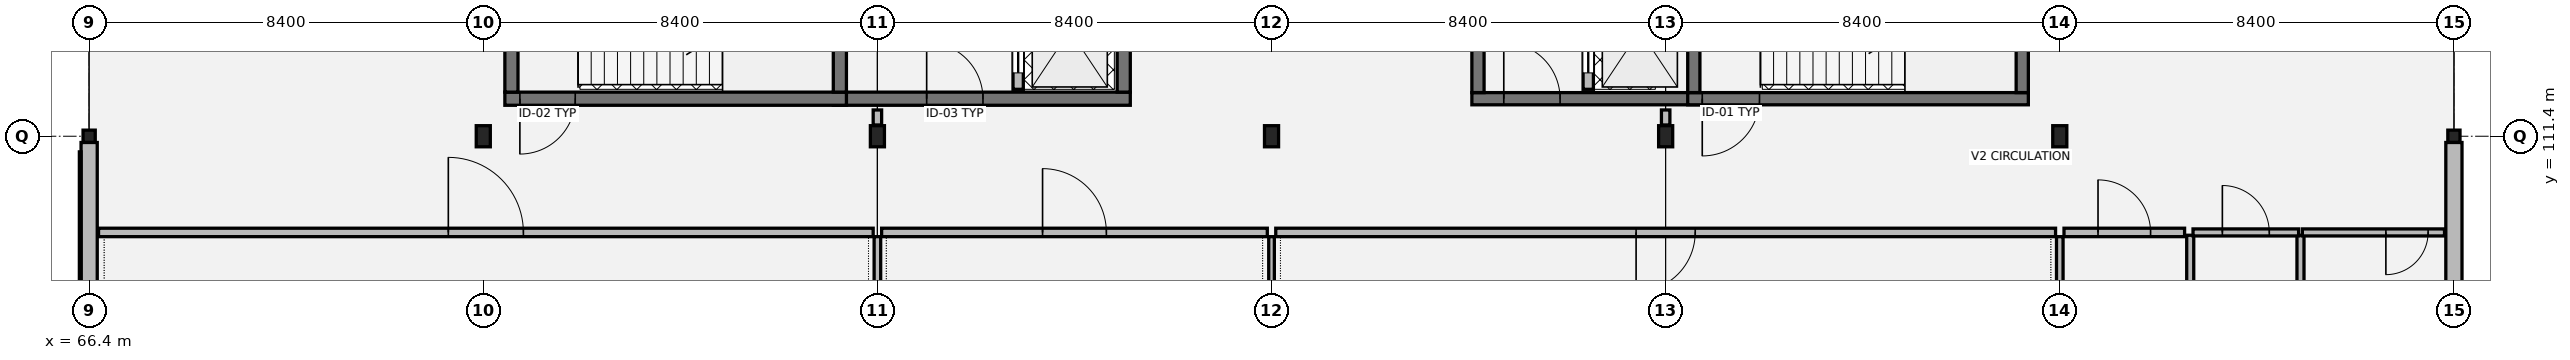
"""IFC4 building model, lengths in metres.
Left out: names, types, materials, properties, quantities, classifications, styles, units other than length and angle.
Written with IfcOpenShell. Run it as: python <this file> out.ifc"""

import sys

from ifc_helpers import new_model, si_unit, direction, frame, frame_2d, origin, origin_2d, place, context, subcontext, project, spatial, rectangle, hollow_rectangle, i_section, extrude, element, fill, save


model = new_model("IFC4")
c1 = context("Model", 3, precision=1e-05, world=origin(), true_north=direction((0.0, 1.0)))
c2 = subcontext(c1, "Body", "Model", "MODEL_VIEW")
j1 = project(units=[si_unit("LENGTHUNIT", "METRE"), si_unit("PLANEANGLEUNIT", "RADIAN")], contexts=[c1])
p1 = place(None, origin())
s1 = spatial("IfcSite", under=j1, at=p1, CompositionType="ELEMENT")
p2 = place(p1, origin())
s2 = spatial("IfcBuilding", under=s1, at=p2, CompositionType="ELEMENT")
p3 = place(p2, frame((0.0, 0.0, 9.18)))
s3 = spatial("IfcBuildingStorey", under=s2, at=p3, CompositionType="ELEMENT", Elevation=9.18)
p4 = place(p3, frame((66.4, 111.4, 0.0), z_axis=(0.0, 0.0, 1.0), x_axis=(1.0, 0.0, 0.0)))
e1 = element("IfcColumn", 1, at=p4, inside=s3, PredefinedType="COLUMN", context=c2, shape_type="SweptSolid", body=[
    extrude(hollow_rectangle(XDim=0.26, YDim=0.26, WallThickness=0.012, at=origin_2d()), origin(), (0.0, 0.0, 1.0), 4.055),
])
for number, where, z_axis, x_axis in (
    (2, (74.8, 111.4, 0.0), (0.0, 0.0, 1.0), (1.0, 0.0, 0.0)),
    (3, (83.2, 111.4, 0.0), (0.0, 0.0, 1.0), (1.0, 0.0, 0.0)),
    (4, (91.6, 111.4, 0.0), (0.0, 0.0, 1.0), (1.0, 0.0, 0.0)),
    (5, (100.0, 111.4, 0.0), (0.0, 0.0, 1.0), (1.0, 0.0, 0.0)),
    (6, (108.4, 111.4, 0.0), (0.0, 0.0, 1.0), (1.0, 0.0, 0.0)),
):
    element("IfcColumn", number, at=place(p3, frame(where, z_axis=z_axis, x_axis=x_axis)), inside=s3, PredefinedType="COLUMN", context=c2, shape_type="SweptSolid", body=[
        extrude(i_section(OverallWidth=0.3, OverallDepth=0.45, WebThickness=0.014, FlangeThickness=0.026, at=origin_2d()), origin(), (0.0, 0.0, 1.0), 4.055),
    ])
p5 = place(p3, frame((116.8, 111.4, 0.0), z_axis=(0.0, 0.0, 1.0), x_axis=(1.0, 0.0, 0.0)))
e7 = element("IfcColumn", 7, at=p5, inside=s3, PredefinedType="COLUMN", context=c2, shape_type="SweptSolid", body=[
    extrude(hollow_rectangle(XDim=0.26, YDim=0.26, WallThickness=0.012, at=origin_2d()), origin(), (0.0, 0.0, 1.0), 4.055),
])
for number, where, z_axis, x_axis in (
    (8, (116.8, 103.933, 0.0), (0.0, 0.0, 1.0), (0.0, 1.0, 0.0)),
    (9, (66.4, 111.267, 0.0), (0.0, 0.0, 1.0), (0.0, -1.0, 0.0)),
):
    element("IfcWall", number, at=place(p3, frame(where, z_axis=z_axis, x_axis=x_axis)), inside=s3, PredefinedType="SOLIDWALL", context=c2, shape_type="SweptSolid", body=[
        extrude(rectangle(XDim=7.334, YDim=0.345, at=frame_2d((3.667, 0.0))), origin(), (0.0, 0.0, 1.0), 3.48),
    ])
p6 = place(p3, frame((82.26, 112.2, 0.0), z_axis=(0.0, 0.0, 1.0), x_axis=(1.0, 0.0, 0.0)))
e10 = element("IfcWall", 10, at=p6, inside=s3, PredefinedType="SHEAR", context=c2, shape_type="SweptSolid", body=[
    extrude(rectangle(XDim=6.33, YDim=0.28, at=frame_2d((3.165, 0.0))), origin(), (0.0, 0.0, 1.0), 3.845),
])
p7 = place(p6, frame((1.99, 0.0, 0.0)))
e11 = element("IfcOpeningElement", 11, at=p7, cuts=e10, PredefinedType="OPENING", context=c2, shape_type="SweptSolid", body=[
    extrude(rectangle(XDim=1.2, YDim=2.16, at=frame_2d((0.6, 1.08))), frame((0.0, 0.15, 0.0), z_axis=(0.0, -1.0, 0.0), x_axis=(1.0, 0.0, 0.0)), (0.0, 0.0, 1.0), 0.3),
])
p8 = place(p3, frame((88.45, 112.34, 0.0), z_axis=(0.0, 0.0, 1.0), x_axis=(0.0, 1.0, 0.0)))
e12 = element("IfcWall", 12, at=p8, inside=s3, PredefinedType="SHEAR", context=c2, shape_type="SweptSolid", body=[
    extrude(rectangle(XDim=5.72, YDim=0.28, at=frame_2d((2.86, 0.0))), origin(), (0.0, 0.0, 1.0), 3.845),
])
p9 = place(p3, frame((86.2, 112.4, 0.0), z_axis=(0.0, 0.0, 1.0), x_axis=(0.0, 1.0, 0.0)))
e13 = element("IfcWall", 13, at=p9, inside=s3, PredefinedType="SOLIDWALL", context=c2, shape_type="SweptSolid", body=[
    extrude(rectangle(XDim=5.6, YDim=0.22, at=frame_2d((2.8, 0.0))), origin(), (0.0, 0.0, 1.0), 3.845),
])
p10 = place(p9, frame((0.35, 0.0, 0.0)))
e14 = element("IfcOpeningElement", 14, at=p10, cuts=e13, PredefinedType="OPENING", context=c2, shape_type="SweptSolid", body=[
    extrude(rectangle(XDim=1.1, YDim=2.15, at=frame_2d((0.55, 1.075))), frame((0.0, 0.12, 0.0), z_axis=(0.0, -1.0, 0.0), x_axis=(1.0, 0.0, 0.0)), (0.0, 0.0, 1.0), 0.24),
])
p11 = place(p9, frame((2.4, 0.0, 0.0)))
e15 = element("IfcOpeningElement", 15, at=p11, cuts=e13, PredefinedType="OPENING", context=c2, shape_type="SweptSolid", body=[
    extrude(rectangle(XDim=1.1, YDim=2.15, at=frame_2d((0.55, 1.075))), frame((0.0, 0.12, 0.0), z_axis=(0.0, -1.0, 0.0), x_axis=(1.0, 0.0, 0.0)), (0.0, 0.0, 1.0), 0.24),
])
p12 = place(p3, frame((75.26, 112.2, 0.0), z_axis=(0.0, 0.0, 1.0), x_axis=(1.0, 0.0, 0.0)))
e16 = element("IfcWall", 16, at=p12, inside=s3, PredefinedType="SHEAR", context=c2, shape_type="SweptSolid", body=[
    extrude(rectangle(XDim=7.28, YDim=0.28, at=frame_2d((3.64, 0.0))), origin(), (0.0, 0.0, 1.0), 3.845),
])
p13 = place(p12, frame((0.32, 0.0, 0.0)))
e17 = element("IfcOpeningElement", 17, at=p13, cuts=e16, PredefinedType="OPENING", context=c2, shape_type="SweptSolid", body=[
    extrude(rectangle(XDim=1.18, YDim=2.18, at=frame_2d((0.59, 1.09))), frame((0.0, 0.15, 0.0), z_axis=(0.0, -1.0, 0.0), x_axis=(1.0, 0.0, 0.0)), (0.0, 0.0, 1.0), 0.3),
])
for number, where, z_axis, x_axis in (
    (18, (75.4, 112.34, 0.0), (0.0, 0.0, 1.0), (0.0, 1.0, 0.0)),
    (19, (82.4, 112.34, 0.0), (0.0, 0.0, 1.0), (0.0, 1.0, 0.0)),
):
    element("IfcWall", number, at=place(p3, frame(where, z_axis=z_axis, x_axis=x_axis)), inside=s3, PredefinedType="SHEAR", context=c2, shape_type="SweptSolid", body=[
        extrude(rectangle(XDim=5.72, YDim=0.28, at=frame_2d((2.86, 0.0))), origin(), (0.0, 0.0, 1.0), 3.845),
    ])
p14 = place(p3, frame((95.87, 112.2, 0.0), z_axis=(0.0, 0.0, 1.0), x_axis=(1.0, 0.0, 0.0)))
e20 = element("IfcWall", 20, at=p14, inside=s3, PredefinedType="SHEAR", context=c2, shape_type="SweptSolid", body=[
    extrude(rectangle(XDim=4.86, YDim=0.26, at=frame_2d((2.43, 0.0))), origin(), (0.0, 0.0, 1.0), 3.845),
])
p15 = place(p14, frame((0.68, 0.0, 0.0)))
e21 = element("IfcOpeningElement", 21, at=p15, cuts=e20, PredefinedType="OPENING", context=c2, shape_type="SweptSolid", body=[
    extrude(rectangle(XDim=1.2, YDim=2.16, at=frame_2d((0.6, 1.08))), frame((0.0, 0.14, 0.0), z_axis=(0.0, -1.0, 0.0), x_axis=(1.0, 0.0, 0.0)), (0.0, 0.0, 1.0), 0.28),
])
p16 = place(p3, frame((96.0, 118.07, 0.0), z_axis=(0.0, 0.0, 1.0), x_axis=(0.0, -1.0, 0.0)))
e22 = element("IfcWall", 22, at=p16, inside=s3, PredefinedType="SHEAR", context=c2, shape_type="SweptSolid", body=[
    extrude(rectangle(XDim=5.74, YDim=0.26, at=frame_2d((2.87, 0.0))), origin(), (0.0, 0.0, 1.0), 3.845),
])
p17 = place(p3, frame((98.35, 112.4, 0.0), z_axis=(0.0, 0.0, 1.0), x_axis=(0.0, 1.0, 0.0)))
e23 = element("IfcWall", 23, at=p17, inside=s3, PredefinedType="SOLIDWALL", context=c2, shape_type="SweptSolid", body=[
    extrude(rectangle(XDim=5.6, YDim=0.22, at=frame_2d((2.8, 0.0))), origin(), (0.0, 0.0, 1.0), 3.845),
])
p18 = place(p17, frame((0.35, 0.0, 0.0)))
e24 = element("IfcOpeningElement", 24, at=p18, cuts=e23, PredefinedType="OPENING", context=c2, shape_type="SweptSolid", body=[
    extrude(rectangle(XDim=1.1, YDim=2.15, at=frame_2d((0.55, 1.075))), frame((0.0, 0.12, 0.0), z_axis=(0.0, -1.0, 0.0), x_axis=(1.0, 0.0, 0.0)), (0.0, 0.0, 1.0), 0.24),
])
p19 = place(p3, frame((100.47, 112.2, 0.0), z_axis=(0.0, 0.0, 1.0), x_axis=(1.0, 0.0, 0.0)))
e25 = element("IfcWall", 25, at=p19, inside=s3, PredefinedType="SHEAR", context=c2, shape_type="SweptSolid", body=[
    extrude(rectangle(XDim=7.26, YDim=0.26, at=frame_2d((3.63, 0.0))), origin(), (0.0, 0.0, 1.0), 3.845),
])
p20 = place(p19, frame((0.31, 0.0, 0.0)))
e26 = element("IfcOpeningElement", 26, at=p20, cuts=e25, PredefinedType="OPENING", context=c2, shape_type="SweptSolid", body=[
    extrude(rectangle(XDim=1.22, YDim=2.18, at=frame_2d((0.61, 1.09))), frame((0.0, 0.14, 0.0), z_axis=(0.0, -1.0, 0.0), x_axis=(1.0, 0.0, 0.0)), (0.0, 0.0, 1.0), 0.28),
])
for number, where, z_axis, x_axis in (
    (27, (100.6, 112.33, 0.0), (0.0, 0.0, 1.0), (0.0, 1.0, 0.0)),
    (28, (107.6, 112.33, 0.0), (0.0, 0.0, 1.0), (0.0, 1.0, 0.0)),
):
    element("IfcWall", number, at=place(p3, frame(where, z_axis=z_axis, x_axis=x_axis)), inside=s3, PredefinedType="SHEAR", context=c2, shape_type="SweptSolid", body=[
        extrude(rectangle(XDim=5.74, YDim=0.26, at=frame_2d((2.87, 0.0))), origin(), (0.0, 0.0, 1.0), 3.845),
    ])
for number, where, z_axis, x_axis in (
    (29, (111.18, 106.93, 0.0), (0.0, 0.0, 1.0), (0.0, 1.0, 0.0)),
    (30, (113.53, 106.93, 0.0), (0.0, 0.0, 1.0), (0.0, 1.0, 0.0)),
):
    element("IfcWall", number, at=place(p3, frame(where, z_axis=z_axis, x_axis=x_axis)), inside=s3, PredefinedType="PARTITIONING", context=c2, shape_type="SweptSolid", body=[
        extrude(rectangle(XDim=2.36, YDim=0.15, at=frame_2d((1.18, 0.0))), origin(), (0.0, 0.0, 1.0), 3.18),
    ])
p21 = place(p3, frame((111.24, 109.35, 0.0), z_axis=(0.0, 0.0, 1.0), x_axis=(1.0, 0.0, 0.0)))
e31 = element("IfcWall", 31, at=p21, inside=s3, PredefinedType="PARTITIONING", context=c2, shape_type="SweptSolid", body=[
    extrude(rectangle(XDim=2.25, YDim=0.15, at=frame_2d((1.125, 0.0))), origin(), (0.0, 0.0, 1.0), 3.18),
])
p22 = place(p21, frame((0.625, 0.0, 0.0)))
e32 = element("IfcOpeningElement", 32, at=p22, cuts=e31, PredefinedType="OPENING", context=c2, shape_type="SweptSolid", body=[
    extrude(rectangle(XDim=1.0, YDim=2.15, at=frame_2d((0.5, 1.075))), frame((0.0, 0.085, 0.0), z_axis=(0.0, -1.0, 0.0), x_axis=(1.0, 0.0, 0.0)), (0.0, 0.0, 1.0), 0.17),
])
p23 = place(p3, frame((113.57, 109.35, 0.0), z_axis=(0.0, 0.0, 1.0), x_axis=(1.0, 0.0, 0.0)))
e33 = element("IfcWall", 33, at=p23, inside=s3, PredefinedType="PARTITIONING", context=c2, shape_type="SweptSolid", body=[
    extrude(rectangle(XDim=3.03, YDim=0.15, at=frame_2d((1.515, 0.0))), origin(), (0.0, 0.0, 1.0), 3.18),
])
p24 = place(p23, frame((1.78, 0.0, 0.0)))
e34 = element("IfcOpeningElement", 34, at=p24, cuts=e33, PredefinedType="OPENING", context=c2, shape_type="SweptSolid", body=[
    extrude(rectangle(XDim=0.9, YDim=2.15, at=frame_2d((0.45, 1.075))), frame((0.0, 0.085, 0.0), z_axis=(0.0, -1.0, 0.0), x_axis=(1.0, 0.0, 0.0)), (0.0, 0.0, 1.0), 0.17),
])
p25 = place(p3, frame((66.6, 109.35, 0.0), z_axis=(0.0, 0.0, 1.0), x_axis=(1.0, 0.0, 0.0)))
e35 = element("IfcWall", 35, at=p25, inside=s3, PredefinedType="PARTITIONING", context=c2, shape_type="SweptSolid", body=[
    extrude(rectangle(XDim=16.51, YDim=0.18, at=frame_2d((8.255, 0.0))), origin(), (0.0, 0.0, 1.0), 3.18),
])
p26 = place(p25, frame((7.455, 0.0, 0.0)))
e36 = element("IfcOpeningElement", 36, at=p26, cuts=e35, PredefinedType="OPENING", context=c2, shape_type="SweptSolid", body=[
    extrude(rectangle(XDim=1.6, YDim=2.25, at=frame_2d((0.8, 1.125))), frame((0.0, 0.1, 0.0), z_axis=(0.0, -1.0, 0.0), x_axis=(1.0, 0.0, 0.0)), (0.0, 0.0, 1.0), 0.2),
])
p27 = place(p3, frame((83.29, 109.35, 0.0), z_axis=(0.0, 0.0, 1.0), x_axis=(1.0, 0.0, 0.0)))
e37 = element("IfcWall", 37, at=p27, inside=s3, PredefinedType="PARTITIONING", context=c2, shape_type="SweptSolid", body=[
    extrude(rectangle(XDim=8.22, YDim=0.18, at=frame_2d((4.11, 0.0))), origin(), (0.0, 0.0, 1.0), 3.18),
])
p28 = place(p27, frame((3.43, 0.0, 0.0)))
e38 = element("IfcOpeningElement", 38, at=p28, cuts=e37, PredefinedType="OPENING", context=c2, shape_type="SweptSolid", body=[
    extrude(rectangle(XDim=1.36, YDim=2.2, at=frame_2d((0.68, 1.1))), frame((0.0, 0.1, 0.0), z_axis=(0.0, -1.0, 0.0), x_axis=(1.0, 0.0, 0.0)), (0.0, 0.0, 1.0), 0.2),
])
p29 = place(p3, frame((91.69, 109.35, 0.0), z_axis=(0.0, 0.0, 1.0), x_axis=(1.0, 0.0, 0.0)))
e39 = element("IfcWall", 39, at=p29, inside=s3, PredefinedType="PARTITIONING", context=c2, shape_type="SweptSolid", body=[
    extrude(rectangle(XDim=16.62, YDim=0.18, at=frame_2d((8.31, 0.0))), origin(), (0.0, 0.0, 1.0), 3.18),
])
p30 = place(p29, frame((7.68, 0.0, 0.0)))
e40 = element("IfcOpeningElement", 40, at=p30, cuts=e39, PredefinedType="OPENING", context=c2, shape_type="SweptSolid", body=[
    extrude(rectangle(XDim=1.26, YDim=2.2, at=frame_2d((0.63, 1.1))), frame((0.0, 0.1, 0.0), z_axis=(0.0, -1.0, 0.0), x_axis=(1.0, 0.0, 0.0)), (0.0, 0.0, 1.0), 0.2),
])
p31 = place(p3, frame((108.49, 109.35, 0.0), z_axis=(0.0, 0.0, 1.0), x_axis=(1.0, 0.0, 0.0)))
e41 = element("IfcWall", 41, at=p31, inside=s3, PredefinedType="PARTITIONING", context=c2, shape_type="SweptSolid", body=[
    extrude(rectangle(XDim=2.57, YDim=0.18, at=frame_2d((1.285, 0.0))), origin(), (0.0, 0.0, 1.0), 3.18),
])
p32 = place(p31, frame((0.725, 0.0, 0.0)))
e42 = element("IfcOpeningElement", 42, at=p32, cuts=e41, PredefinedType="OPENING", context=c2, shape_type="SweptSolid", body=[
    extrude(rectangle(XDim=1.12, YDim=2.15, at=frame_2d((0.56, 1.075))), frame((0.0, 0.1, 0.0), z_axis=(0.0, -1.0, 0.0), x_axis=(1.0, 0.0, 0.0)), (0.0, 0.0, 1.0), 0.2),
])
for number, where, z_axis, x_axis in (
    (43, (83.2, 111.64, 0.0), (0.0, 0.0, 1.0), (0.0, 1.0, 0.0)),
    (44, (100.0, 111.64, 0.0), (0.0, 0.0, 1.0), (0.0, 1.0, 0.0)),
):
    element("IfcWall", number, at=place(p3, frame(where, z_axis=z_axis, x_axis=x_axis)), inside=s3, PredefinedType="PARTITIONING", context=c2, shape_type="SweptSolid", body=[
        extrude(rectangle(XDim=0.32, YDim=0.18, at=frame_2d((0.16, 0.0))), origin(), (0.0, 0.0, 1.0), 3.18),
    ])
p33 = place(p3, frame((83.2, 81.32, 0.0), z_axis=(0.0, 0.0, 1.0), x_axis=(0.0, 1.0, 0.0)))
e45 = element("IfcWall", 45, at=p33, inside=s3, PredefinedType="PARTITIONING", context=c2, shape_type="SweptSolid", body=[
    extrude(rectangle(XDim=27.94, YDim=0.14, at=frame_2d((13.97, 0.0))), origin(), (0.0, 0.0, 1.0), 3.18),
])
p34 = place(p3, frame((91.6, 81.32, 0.0), z_axis=(0.0, 0.0, 1.0), x_axis=(0.0, 1.0, 0.0)))
e46 = element("IfcWall", 46, at=p34, inside=s3, PredefinedType="PARTITIONING", context=c2, shape_type="SweptSolid", body=[
    extrude(rectangle(XDim=27.94, YDim=0.12, at=frame_2d((13.97, 0.0))), origin(), (0.0, 0.0, 1.0), 3.18),
])
p35 = place(p3, frame((108.4, 81.32, 0.0), z_axis=(0.0, 0.0, 1.0), x_axis=(0.0, 1.0, 0.0)))
e47 = element("IfcWall", 47, at=p35, inside=s3, PredefinedType="PARTITIONING", context=c2, shape_type="SweptSolid", body=[
    extrude(rectangle(XDim=27.94, YDim=0.14, at=frame_2d((13.97, 0.0))), origin(), (0.0, 0.0, 1.0), 3.18),
])
p36 = place(p7, origin())
e48 = element("IfcDoor", 48, at=p36, inside=s3, OperationType="SINGLE_SWING_LEFT", PredefinedType="DOOR", context=c2, shape_type="SweptSolid", body=[
    extrude(rectangle(XDim=1.2, YDim=2.16, at=frame_2d((0.6, 1.08))), frame((0.0, 0.025, 0.0), z_axis=(0.0, -1.0, 0.0), x_axis=(1.0, 0.0, 0.0)), (0.0, 0.0, 1.0), 0.05),
])
fill(e11, e48)
p37 = place(p10, origin())
e49 = element("IfcDoor", 49, at=p37, inside=s3, OperationType="SLIDING_TO_LEFT", PredefinedType="DOOR", context=c2, shape_type="SweptSolid", body=[
    extrude(rectangle(XDim=1.1, YDim=2.15, at=frame_2d((0.55, 1.075))), frame((0.0, 0.025, 0.0), z_axis=(0.0, -1.0, 0.0), x_axis=(1.0, 0.0, 0.0)), (0.0, 0.0, 1.0), 0.05),
])
fill(e14, e49)
p38 = place(p13, origin())
e50 = element("IfcDoor", 50, at=p38, inside=s3, OperationType="SINGLE_SWING_RIGHT", PredefinedType="DOOR", context=c2, shape_type="SweptSolid", body=[
    extrude(rectangle(XDim=1.18, YDim=2.18, at=frame_2d((0.59, 1.09))), frame((0.0, 0.025, 0.0), z_axis=(0.0, -1.0, 0.0), x_axis=(1.0, 0.0, 0.0)), (0.0, 0.0, 1.0), 0.05),
])
fill(e17, e50)
p39 = place(p15, origin())
e51 = element("IfcDoor", 51, at=p39, inside=s3, OperationType="SINGLE_SWING_LEFT", PredefinedType="DOOR", context=c2, shape_type="SweptSolid", body=[
    extrude(rectangle(XDim=1.2, YDim=2.16, at=frame_2d((0.6, 1.08))), frame((0.0, 0.025, 0.0), z_axis=(0.0, -1.0, 0.0), x_axis=(1.0, 0.0, 0.0)), (0.0, 0.0, 1.0), 0.05),
])
fill(e21, e51)
p40 = place(p18, origin())
e52 = element("IfcDoor", 52, at=p40, inside=s3, OperationType="SLIDING_TO_LEFT", PredefinedType="DOOR", context=c2, shape_type="SweptSolid", body=[
    extrude(rectangle(XDim=1.1, YDim=2.15, at=frame_2d((0.55, 1.075))), frame((0.0, 0.025, 0.0), z_axis=(0.0, -1.0, 0.0), x_axis=(1.0, 0.0, 0.0)), (0.0, 0.0, 1.0), 0.05),
])
fill(e24, e52)
p41 = place(p20, origin())
e53 = element("IfcDoor", 53, at=p41, inside=s3, OperationType="SINGLE_SWING_RIGHT", PredefinedType="DOOR", context=c2, shape_type="SweptSolid", body=[
    extrude(rectangle(XDim=1.22, YDim=2.18, at=frame_2d((0.61, 1.09))), frame((0.0, 0.025, 0.0), z_axis=(0.0, -1.0, 0.0), x_axis=(1.0, 0.0, 0.0)), (0.0, 0.0, 1.0), 0.05),
])
fill(e26, e53)
p42 = place(p22, origin())
e54 = element("IfcDoor", 54, at=p42, inside=s3, OperationType="SINGLE_SWING_LEFT", PredefinedType="DOOR", context=c2, shape_type="SweptSolid", body=[
    extrude(rectangle(XDim=1.0, YDim=2.15, at=frame_2d((0.5, 1.075))), frame((0.0, 0.025, 0.0), z_axis=(0.0, -1.0, 0.0), x_axis=(1.0, 0.0, 0.0)), (0.0, 0.0, 1.0), 0.05),
])
fill(e32, e54)
p43 = place(p24, origin())
e55 = element("IfcDoor", 55, at=p43, inside=s3, OperationType="SINGLE_SWING_RIGHT", PredefinedType="DOOR", context=c2, shape_type="SweptSolid", body=[
    extrude(rectangle(XDim=0.9, YDim=2.15, at=frame_2d((0.45, 1.075))), frame((0.0, 0.025, 0.0), z_axis=(0.0, -1.0, 0.0), x_axis=(1.0, 0.0, 0.0)), (0.0, 0.0, 1.0), 0.05),
])
fill(e34, e55)
p44 = place(p26, origin())
e56 = element("IfcDoor", 56, at=p44, inside=s3, OperationType="DOUBLE_DOOR_SINGLE_SWING", PredefinedType="DOOR", context=c2, shape_type="SweptSolid", body=[
    extrude(rectangle(XDim=1.6, YDim=2.25, at=frame_2d((0.8, 1.125))), frame((0.0, 0.025, 0.0), z_axis=(0.0, -1.0, 0.0), x_axis=(1.0, 0.0, 0.0)), (0.0, 0.0, 1.0), 0.05),
])
fill(e36, e56)
p45 = place(p28, origin())
e57 = element("IfcDoor", 57, at=p45, inside=s3, OperationType="SINGLE_SWING_LEFT", PredefinedType="DOOR", context=c2, shape_type="SweptSolid", body=[
    extrude(rectangle(XDim=1.36, YDim=2.2, at=frame_2d((0.68, 1.1))), frame((0.0, 0.025, 0.0), z_axis=(0.0, -1.0, 0.0), x_axis=(1.0, 0.0, 0.0)), (0.0, 0.0, 1.0), 0.05),
])
fill(e38, e57)
p46 = place(p30, origin())
e58 = element("IfcDoor", 58, at=p46, inside=s3, OperationType="SINGLE_SWING_RIGHT", PredefinedType="DOOR", context=c2, shape_type="SweptSolid", body=[
    extrude(rectangle(XDim=1.26, YDim=2.2, at=frame_2d((0.63, 1.1))), frame((0.0, 0.025, 0.0), z_axis=(0.0, -1.0, 0.0), x_axis=(1.0, 0.0, 0.0)), (0.0, 0.0, 1.0), 0.05),
])
fill(e40, e58)
p47 = place(p32, origin())
e59 = element("IfcDoor", 59, at=p47, inside=s3, OperationType="SINGLE_SWING_LEFT", PredefinedType="DOOR", context=c2, shape_type="SweptSolid", body=[
    extrude(rectangle(XDim=1.12, YDim=2.15, at=frame_2d((0.56, 1.075))), frame((0.0, 0.025, 0.0), z_axis=(0.0, -1.0, 0.0), x_axis=(1.0, 0.0, 0.0)), (0.0, 0.0, 1.0), 0.05),
])
fill(e42, e59)
save(model, sys.argv[1])
